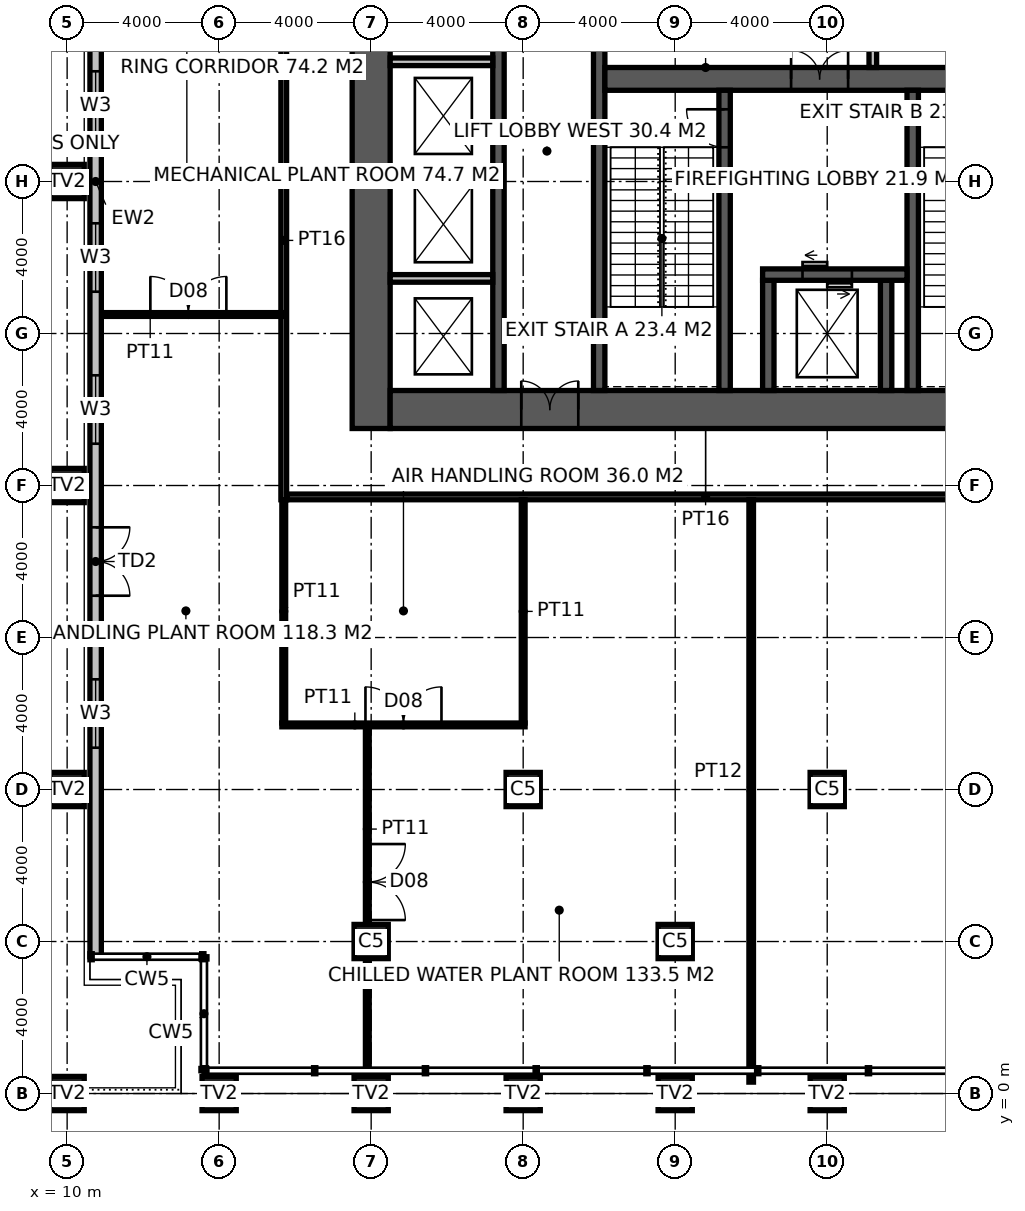
"""IFC4 building model, lengths in metres.
Left out: names, types, materials, properties, quantities, classifications, styles, units other than length and angle.
Written with IfcOpenShell. Run it as: python <this file> out.ifc"""

import sys

from ifc_helpers import new_model, si_unit, direction, frame, frame_2d, origin, origin_2d, place, context, subcontext, project, spatial, rectangle, hollow_rectangle, extrude, element, fill, save


model = new_model("IFC4")
c1 = context("Model", 3, precision=1e-05, world=origin(), true_north=direction((0.0, 1.0)))
c2 = subcontext(c1, "Body", "Model", "MODEL_VIEW")
j1 = project(units=[si_unit("LENGTHUNIT", "METRE"), si_unit("PLANEANGLEUNIT", "RADIAN")], contexts=[c1])
p1 = place(None, origin())
s1 = spatial("IfcSite", under=j1, at=p1, CompositionType="ELEMENT")
p2 = place(p1, origin())
s2 = spatial("IfcBuilding", under=s1, at=p2, CompositionType="ELEMENT")
p3 = place(p2, frame((0.0, 0.0, 71.0)))
s3 = spatial("IfcBuildingStorey", under=s2, at=p3, CompositionType="ELEMENT", Elevation=71.0)
for number, where, z_axis, x_axis in (
    (1, (10.0, 0.0, 0.0), (0.0, 0.0, 1.0), (1.0, 0.0, 0.0)),
    (2, (10.0, 8.0, 0.0), (0.0, 0.0, 1.0), (1.0, 0.0, 0.0)),
    (3, (10.0, 16.0, 0.0), (0.0, 0.0, 1.0), (1.0, 0.0, 0.0)),
    (4, (10.0, 24.0, 0.0), (0.0, 0.0, 1.0), (1.0, 0.0, 0.0)),
    (5, (14.0, 0.0, 0.0), (0.0, 0.0, 1.0), (1.0, 0.0, 0.0)),
    (6, (18.0, 0.0, 0.0), (0.0, 0.0, 1.0), (1.0, 0.0, 0.0)),
    (7, (22.0, 0.0, 0.0), (0.0, 0.0, 1.0), (1.0, 0.0, 0.0)),
    (8, (26.0, 0.0, 0.0), (0.0, 0.0, 1.0), (1.0, 0.0, 0.0)),
    (9, (30.0, 0.0, 0.0), (0.0, 0.0, 1.0), (1.0, 0.0, 0.0)),
):
    element("IfcColumn", number, at=place(p3, frame(where, z_axis=z_axis, x_axis=x_axis)), inside=s3, PredefinedType="USERDEFINED", context=c2, shape_type="SweptSolid", body=[
        extrude(hollow_rectangle(XDim=0.9, YDim=0.9, WallThickness=0.1, at=origin_2d()), origin(), (0.0, 0.0, 1.0), 5.4),
    ])
for number, where, z_axis, x_axis in (
    (10, (18.0, 4.0, 0.0), (0.0, 0.0, 1.0), (1.0, 0.0, 0.0)),
    (11, (22.0, 8.0, 0.0), (0.0, 0.0, 1.0), (1.0, 0.0, 0.0)),
    (12, (26.0, 4.0, 0.0), (0.0, 0.0, 1.0), (1.0, 0.0, 0.0)),
    (13, (30.0, 8.0, 0.0), (0.0, 0.0, 1.0), (1.0, 0.0, 0.0)),
):
    element("IfcColumn", number, at=place(p3, frame(where, z_axis=z_axis, x_axis=x_axis)), inside=s3, PredefinedType="COLUMN", context=c2, shape_type="SweptSolid", body=[
        extrude(hollow_rectangle(XDim=0.9, YDim=0.9, WallThickness=0.1, at=origin_2d()), origin(), (0.0, 0.0, 1.0), 5.4),
    ])
p4 = place(p3, frame((18.0, 17.5, -0.15), z_axis=(0.0, 0.0, 1.0), x_axis=(0.0, 1.0, 0.0)))
e14 = element("IfcWall", 14, at=p4, inside=s3, PredefinedType="SHEAR", context=c2, shape_type="SweptSolid", body=[
    extrude(rectangle(XDim=19.0, YDim=1.0, at=frame_2d((9.5, 0.0))), origin(), (0.0, 0.0, 1.0), 5.4),
])
p5 = place(p3, frame((18.5, 18.0, -0.15), z_axis=(0.0, 0.0, 1.0), x_axis=(1.0, 0.0, 0.0)))
e15 = element("IfcWall", 15, at=p5, inside=s3, PredefinedType="SHEAR", context=c2, shape_type="SweptSolid", body=[
    extrude(rectangle(XDim=17.6, YDim=1.0, at=frame_2d((8.8, 0.0))), origin(), (0.0, 0.0, 1.0), 5.4),
])
p6 = place(p5, frame((3.45, 0.0, 0.15)))
e16 = element("IfcOpeningElement", 16, at=p6, cuts=e15, PredefinedType="OPENING", context=c2, shape_type="SweptSolid", body=[
    extrude(rectangle(XDim=1.5, YDim=2.4, at=frame_2d((0.75, 1.2))), frame((0.0, 0.51, 0.0), z_axis=(0.0, -1.0, 0.0), x_axis=(1.0, 0.0, 0.0)), (0.0, 0.0, 1.0), 1.02),
])
p7 = place(p3, frame((24.0, 18.5, -0.15), z_axis=(0.0, 0.0, 1.0), x_axis=(0.0, 1.0, 0.0)))
e17 = element("IfcWall", 17, at=p7, inside=s3, PredefinedType="SHEAR", context=c2, shape_type="SweptSolid", body=[
    extrude(rectangle(XDim=17.0, YDim=0.3, at=frame_2d((8.5, 0.0))), origin(), (0.0, 0.0, 1.0), 5.4),
])
p8 = place(p7, frame((9.6, 0.0, 0.15)))
e18 = element("IfcOpeningElement", 18, at=p8, cuts=e17, PredefinedType="OPENING", context=c2, shape_type="SweptSolid", body=[
    extrude(rectangle(XDim=1.5, YDim=2.4, at=frame_2d((0.75, 1.2))), frame((0.0, 0.16, 0.0), z_axis=(0.0, -1.0, 0.0), x_axis=(1.0, 0.0, 0.0)), (0.0, 0.0, 1.0), 0.32),
])
p9 = place(p3, frame((24.15, 26.7, -0.15), z_axis=(0.0, 0.0, 1.0), x_axis=(1.0, 0.0, 0.0)))
e19 = element("IfcWall", 19, at=p9, inside=s3, PredefinedType="SHEAR", context=c2, shape_type="SweptSolid", body=[
    extrude(rectangle(XDim=11.25, YDim=0.6, at=frame_2d((5.625, 0.0))), origin(), (0.0, 0.0, 1.0), 5.4),
])
p10 = place(p9, frame((9.25, 0.0, 0.15)))
e20 = element("IfcOpeningElement", 20, at=p10, cuts=e19, PredefinedType="OPENING", context=c2, shape_type="SweptSolid", body=[
    extrude(rectangle(XDim=1.0, YDim=2.2, at=frame_2d((0.5, 1.1))), frame((0.0, 0.31, 0.0), z_axis=(0.0, -1.0, 0.0), x_axis=(1.0, 0.0, 0.0)), (0.0, 0.0, 1.0), 0.62),
])
p11 = place(p9, frame((4.9, 0.0, 0.15)))
e21 = element("IfcOpeningElement", 21, at=p11, cuts=e19, PredefinedType="OPENING", context=c2, shape_type="SweptSolid", body=[
    extrude(rectangle(XDim=1.5, YDim=2.4, at=frame_2d((0.75, 1.2))), frame((0.0, 0.31, 0.0), z_axis=(0.0, -1.0, 0.0), x_axis=(1.0, 0.0, 0.0)), (0.0, 0.0, 1.0), 0.62),
])
p12 = place(p3, frame((27.3, 18.5, -0.15), z_axis=(0.0, 0.0, 1.0), x_axis=(0.0, 1.0, 0.0)))
e22 = element("IfcWall", 22, at=p12, inside=s3, PredefinedType="SHEAR", context=c2, shape_type="SweptSolid", body=[
    extrude(rectangle(XDim=7.9, YDim=0.3, at=frame_2d((3.95, 0.0))), origin(), (0.0, 0.0, 1.0), 5.4),
])
p13 = place(p12, frame((6.4, 0.0, 0.15)))
e23 = element("IfcOpeningElement", 23, at=p13, cuts=e22, PredefinedType="OPENING", context=c2, shape_type="SweptSolid", body=[
    extrude(rectangle(XDim=1.0, YDim=2.2, at=frame_2d((0.5, 1.1))), frame((0.0, 0.16, 0.0), z_axis=(0.0, -1.0, 0.0), x_axis=(1.0, 0.0, 0.0)), (0.0, 0.0, 1.0), 0.32),
])
p14 = place(p3, frame((32.25, 18.5, -0.15), z_axis=(0.0, 0.0, 1.0), x_axis=(0.0, 1.0, 0.0)))
e24 = element("IfcWall", 24, at=p14, inside=s3, PredefinedType="SHEAR", context=c2, shape_type="SweptSolid", body=[
    extrude(rectangle(XDim=7.9, YDim=0.3, at=frame_2d((3.95, 0.0))), origin(), (0.0, 0.0, 1.0), 5.4),
])
for number, where, z_axis, x_axis in (
    (25, (28.45, 18.5, -0.15), (0.0, 0.0, 1.0), (0.0, 1.0, 0.0)),
    (26, (31.55, 18.5, -0.15), (0.0, 0.0, 1.0), (0.0, 1.0, 0.0)),
):
    element("IfcWall", number, at=place(p3, frame(where, z_axis=z_axis, x_axis=x_axis)), inside=s3, PredefinedType="SHEAR", context=c2, shape_type="SweptSolid", body=[
        extrude(rectangle(XDim=2.9, YDim=0.3, at=frame_2d((1.45, 0.0))), origin(), (0.0, 0.0, 1.0), 5.4),
    ])
p15 = place(p3, frame((28.3, 21.55, -0.15), z_axis=(0.0, 0.0, 1.0), x_axis=(1.0, 0.0, 0.0)))
e27 = element("IfcWall", 27, at=p15, inside=s3, PredefinedType="SHEAR", context=c2, shape_type="SweptSolid", body=[
    extrude(rectangle(XDim=3.8, YDim=0.3, at=frame_2d((1.9, 0.0))), origin(), (0.0, 0.0, 1.0), 5.4),
])
p16 = place(p15, frame((1.05, 0.0, 0.15)))
e28 = element("IfcOpeningElement", 28, at=p16, cuts=e27, PredefinedType="OPENING", context=c2, shape_type="SweptSolid", body=[
    extrude(rectangle(XDim=1.3, YDim=2.4, at=frame_2d((0.65, 1.2))), frame((0.0, 0.16, 0.0), z_axis=(0.0, -1.0, 0.0), x_axis=(1.0, 0.0, 0.0)), (0.0, 0.0, 1.0), 0.32),
])
p17 = place(p3, frame((21.35, 18.5, -0.15), z_axis=(0.0, 0.0, 1.0), x_axis=(0.0, 1.0, 0.0)))
e29 = element("IfcWall", 29, at=p17, inside=s3, PredefinedType="SHEAR", context=c2, shape_type="SweptSolid", body=[
    extrude(rectangle(XDim=12.5, YDim=0.3, at=frame_2d((6.25, 0.0))), origin(), (0.0, 0.0, 1.0), 5.4),
])
for number, where, z_axis, x_axis in (
    (30, (18.5, 21.45, 0.0), (0.0, 0.0, 1.0), (1.0, 0.0, 0.0)),
    (31, (18.5, 24.3, 0.0), (0.0, 0.0, 1.0), (1.0, 0.0, 0.0)),
    (32, (18.5, 27.15, 0.0), (0.0, 0.0, 1.0), (1.0, 0.0, 0.0)),
):
    element("IfcWall", number, at=place(p3, frame(where, z_axis=z_axis, x_axis=x_axis)), inside=s3, PredefinedType="SOLIDWALL", context=c2, shape_type="SweptSolid", body=[
        extrude(rectangle(XDim=2.7, YDim=0.2, at=frame_2d((1.35, 0.0))), origin(), (0.0, 0.0, 1.0), 5.25),
    ])
p18 = place(p3, frame((31.2, 27.0, 0.0), z_axis=(0.0, 0.0, 1.0), x_axis=(0.0, 1.0, 0.0)))
e33 = element("IfcWall", 33, at=p18, inside=s3, PredefinedType="SOLIDWALL", context=c2, shape_type="SweptSolid", body=[
    extrude(rectangle(XDim=3.7, YDim=0.2, at=frame_2d((1.85, 0.0))), origin(), (0.0, 0.0, 1.0), 5.25),
])
p19 = place(p3, frame((15.7, 15.625, 0.0), z_axis=(0.0, 0.0, 1.0), x_axis=(0.0, 1.0, 0.0)))
e34 = element("IfcWall", 34, at=p19, inside=s3, PredefinedType="PARTITIONING", context=c2, shape_type="SweptSolid", body=[
    extrude(rectangle(XDim=22.75, YDim=0.15, at=frame_2d((11.375, 0.0))), origin(), (0.0, 0.0, 1.0), 5.25),
])
p20 = place(p19, frame((12.925, 0.0, 0.0)))
e35 = element("IfcOpeningElement", 35, at=p20, cuts=e34, PredefinedType="OPENING", context=c2, shape_type="SweptSolid", body=[
    extrude(rectangle(XDim=3.0, YDim=3.3, at=frame_2d((1.5, 1.65))), frame((0.0, 0.085, 0.0), z_axis=(0.0, -1.0, 0.0), x_axis=(1.0, 0.0, 0.0)), (0.0, 0.0, 1.0), 0.17),
])
p21 = place(p3, frame((15.775, 15.7, 0.0), z_axis=(0.0, 0.0, 1.0), x_axis=(1.0, 0.0, 0.0)))
e36 = element("IfcWall", 36, at=p21, inside=s3, PredefinedType="PARTITIONING", context=c2, shape_type="SweptSolid", body=[
    extrude(rectangle(XDim=22.05, YDim=0.15, at=frame_2d((11.025, 0.0))), origin(), (0.0, 0.0, 1.0), 5.25),
])
p22 = place(p3, frame((28.0, 0.3, 0.0), z_axis=(0.0, 0.0, 1.0), x_axis=(0.0, 1.0, 0.0)))
e37 = element("IfcWall", 37, at=p22, inside=s3, PredefinedType="PARTITIONING", context=c2, shape_type="SweptSolid", body=[
    extrude(rectangle(XDim=15.325, YDim=0.12, at=frame_2d((7.663, 0.0))), origin(), (0.0, 0.0, 1.0), 5.25),
])
p23 = place(p3, frame((15.65, 9.7, 0.0), z_axis=(0.0, 0.0, 1.0), x_axis=(1.0, 0.0, 0.0)))
e38 = element("IfcWall", 38, at=p23, inside=s3, PredefinedType="PARTITIONING", context=c2, shape_type="SweptSolid", body=[
    extrude(rectangle(XDim=6.4, YDim=0.1, at=frame_2d((3.2, 0.0))), origin(), (0.0, 0.0, 1.0), 5.25),
])
p24 = place(p23, frame((2.2, 0.0, 0.0)))
e39 = element("IfcOpeningElement", 39, at=p24, cuts=e38, PredefinedType="OPENING", context=c2, shape_type="SweptSolid", body=[
    extrude(rectangle(XDim=2.0, YDim=2.4, at=frame_2d((1.0, 1.2))), frame((0.0, 0.06, 0.0), z_axis=(0.0, -1.0, 0.0), x_axis=(1.0, 0.0, 0.0)), (0.0, 0.0, 1.0), 0.12),
])
p25 = place(p3, frame((15.7, 9.75, 0.0), z_axis=(0.0, 0.0, 1.0), x_axis=(0.0, 1.0, 0.0)))
e40 = element("IfcWall", 40, at=p25, inside=s3, PredefinedType="PARTITIONING", context=c2, shape_type="SweptSolid", body=[
    extrude(rectangle(XDim=5.875, YDim=0.1, at=frame_2d((2.938, 0.0))), origin(), (0.0, 0.0, 1.0), 5.25),
])
p26 = place(p3, frame((22.0, 9.75, 0.0), z_axis=(0.0, 0.0, 1.0), x_axis=(0.0, 1.0, 0.0)))
e41 = element("IfcWall", 41, at=p26, inside=s3, PredefinedType="PARTITIONING", context=c2, shape_type="SweptSolid", body=[
    extrude(rectangle(XDim=5.875, YDim=0.1, at=frame_2d((2.938, 0.0))), origin(), (0.0, 0.0, 1.0), 4.35),
])
p27 = place(p3, frame((10.68, 20.5, 0.0), z_axis=(0.0, 0.0, 1.0), x_axis=(1.0, 0.0, 0.0)))
e42 = element("IfcWall", 42, at=p27, inside=s3, PredefinedType="PARTITIONING", context=c2, shape_type="SweptSolid", body=[
    extrude(rectangle(XDim=5.02, YDim=0.1, at=frame_2d((2.51, 0.0))), origin(), (0.0, 0.0, 1.0), 4.05),
])
p28 = place(p27, frame((1.51, 0.0, 0.0)))
e43 = element("IfcOpeningElement", 43, at=p28, cuts=e42, PredefinedType="OPENING", context=c2, shape_type="SweptSolid", body=[
    extrude(rectangle(XDim=2.0, YDim=2.4, at=frame_2d((1.0, 1.2))), frame((0.0, 0.06, 0.0), z_axis=(0.0, -1.0, 0.0), x_axis=(1.0, 0.0, 0.0)), (0.0, 0.0, 1.0), 0.12),
])
p29 = place(p3, frame((17.899, 9.65, 0.0), z_axis=(0.0, 0.0, 1.0), x_axis=(0.0, -1.0, 0.0)))
e44 = element("IfcWall", 44, at=p29, inside=s3, PredefinedType="PARTITIONING", context=c2, shape_type="SweptSolid", body=[
    extrude(rectangle(XDim=8.97, YDim=0.1, at=frame_2d((4.485, 0.0))), origin(), (0.0, 0.0, 1.0), 4.25),
])
p30 = place(p29, frame((3.085, 0.0, 0.0)))
e45 = element("IfcOpeningElement", 45, at=p30, cuts=e44, PredefinedType="OPENING", context=c2, shape_type="SweptSolid", body=[
    extrude(rectangle(XDim=2.0, YDim=2.4, at=frame_2d((1.0, 1.2))), frame((0.0, 0.06, 0.0), z_axis=(0.0, -1.0, 0.0), x_axis=(1.0, 0.0, 0.0)), (0.0, 0.0, 1.0), 0.12),
])
p31 = place(p3, frame((10.75, 44.4, 0.0), z_axis=(0.0, 0.0, 1.0), x_axis=(0.0, -1.0, 0.0)))
e46 = element("IfcWall", 46, at=p31, inside=s3, PredefinedType="ELEMENTEDWALL", context=c2, shape_type="SweptSolid", body=[
    extrude(rectangle(XDim=40.8, YDim=0.3, at=frame_2d((20.4, 0.0))), origin(), (0.0, 0.0, 1.0), 5.25),
])
p32 = place(p31, frame((33.5, 0.0, 0.8)))
e47 = element("IfcOpeningElement", 47, at=p32, cuts=e46, PredefinedType="OPENING", context=c2, shape_type="SweptSolid", body=[
    extrude(rectangle(XDim=1.8, YDim=2.4, at=frame_2d((0.9, 1.2))), frame((0.0, 0.16, 0.0), z_axis=(0.0, -1.0, 0.0), x_axis=(1.0, 0.0, 0.0)), (0.0, 0.0, 1.0), 0.32),
])
p33 = place(p31, frame((29.5, 0.0, 0.0)))
e48 = element("IfcOpeningElement", 48, at=p33, cuts=e46, PredefinedType="OPENING", context=c2, shape_type="SweptSolid", body=[
    extrude(rectangle(XDim=1.8, YDim=2.4, at=frame_2d((0.9, 1.2))), frame((0.0, 0.16, 0.0), z_axis=(0.0, -1.0, 0.0), x_axis=(1.0, 0.0, 0.0)), (0.0, 0.0, 1.0), 0.32),
])
p34 = place(p31, frame((25.5, 0.0, 0.8)))
e49 = element("IfcOpeningElement", 49, at=p34, cuts=e46, PredefinedType="OPENING", context=c2, shape_type="SweptSolid", body=[
    extrude(rectangle(XDim=1.8, YDim=2.4, at=frame_2d((0.9, 1.2))), frame((0.0, 0.16, 0.0), z_axis=(0.0, -1.0, 0.0), x_axis=(1.0, 0.0, 0.0)), (0.0, 0.0, 1.0), 0.32),
])
p35 = place(p31, frame((21.5, 0.0, 0.8)))
e50 = element("IfcOpeningElement", 50, at=p35, cuts=e46, PredefinedType="OPENING", context=c2, shape_type="SweptSolid", body=[
    extrude(rectangle(XDim=1.8, YDim=2.4, at=frame_2d((0.9, 1.2))), frame((0.0, 0.16, 0.0), z_axis=(0.0, -1.0, 0.0), x_axis=(1.0, 0.0, 0.0)), (0.0, 0.0, 1.0), 0.32),
])
p36 = place(p31, frame((17.5, 0.0, 0.8)))
e51 = element("IfcOpeningElement", 51, at=p36, cuts=e46, PredefinedType="OPENING", context=c2, shape_type="SweptSolid", body=[
    extrude(rectangle(XDim=1.8, YDim=2.4, at=frame_2d((0.9, 1.2))), frame((0.0, 0.16, 0.0), z_axis=(0.0, -1.0, 0.0), x_axis=(1.0, 0.0, 0.0)), (0.0, 0.0, 1.0), 0.32),
])
p37 = place(p31, frame((13.5, 0.0, 0.8)))
e52 = element("IfcOpeningElement", 52, at=p37, cuts=e46, PredefinedType="OPENING", context=c2, shape_type="SweptSolid", body=[
    extrude(rectangle(XDim=1.8, YDim=2.4, at=frame_2d((0.9, 1.2))), frame((0.0, 0.16, 0.0), z_axis=(0.0, -1.0, 0.0), x_axis=(1.0, 0.0, 0.0)), (0.0, 0.0, 1.0), 0.32),
])
p38 = place(p31, frame((9.5, 0.0, 0.0)))
e53 = element("IfcOpeningElement", 53, at=p38, cuts=e46, PredefinedType="OPENING", context=c2, shape_type="SweptSolid", body=[
    extrude(rectangle(XDim=1.8, YDim=2.4, at=frame_2d((0.9, 1.2))), frame((0.0, 0.16, 0.0), z_axis=(0.0, -1.0, 0.0), x_axis=(1.0, 0.0, 0.0)), (0.0, 0.0, 1.0), 0.32),
])
p39 = place(p31, frame((5.5, 0.0, 0.8)))
e54 = element("IfcOpeningElement", 54, at=p39, cuts=e46, PredefinedType="OPENING", context=c2, shape_type="SweptSolid", body=[
    extrude(rectangle(XDim=1.8, YDim=2.4, at=frame_2d((0.9, 1.2))), frame((0.0, 0.16, 0.0), z_axis=(0.0, -1.0, 0.0), x_axis=(1.0, 0.0, 0.0)), (0.0, 0.0, 1.0), 0.32),
])
p40 = place(p13, origin())
e55 = element("IfcDoor", 55, at=p40, inside=s3, OperationType="SINGLE_SWING_RIGHT", PredefinedType="DOOR", context=c2, shape_type="SweptSolid", body=[
    extrude(rectangle(XDim=1.0, YDim=2.2, at=frame_2d((0.5, 1.1))), frame((0.0, 0.025, 0.0), z_axis=(0.0, -1.0, 0.0), x_axis=(1.0, 0.0, 0.0)), (0.0, 0.0, 1.0), 0.05),
])
fill(e23, e55)
p41 = place(p11, origin())
e56 = element("IfcDoor", 56, at=p41, inside=s3, OperationType="DOUBLE_DOOR_DOUBLE_SWING", PredefinedType="DOOR", context=c2, shape_type="SweptSolid", body=[
    extrude(rectangle(XDim=1.5, YDim=2.4, at=frame_2d((0.75, 1.2))), frame((0.0, 0.025, 0.0), z_axis=(0.0, -1.0, 0.0), x_axis=(1.0, 0.0, 0.0)), (0.0, 0.0, 1.0), 0.05),
])
fill(e21, e56)
p42 = place(p6, origin())
e57 = element("IfcDoor", 57, at=p42, inside=s3, OperationType="DOUBLE_DOOR_DOUBLE_SWING", PredefinedType="DOOR", context=c2, shape_type="SweptSolid", body=[
    extrude(rectangle(XDim=1.5, YDim=2.4, at=frame_2d((0.75, 1.2))), frame((0.0, 0.025, 0.0), z_axis=(0.0, -1.0, 0.0), x_axis=(1.0, 0.0, 0.0)), (0.0, 0.0, 1.0), 0.05),
])
fill(e16, e57)
p43 = place(p24, origin())
e58 = element("IfcDoor", 58, at=p43, inside=s3, OperationType="DOUBLE_DOOR_DOUBLE_SWING", PredefinedType="DOOR", context=c2, shape_type="SweptSolid", body=[
    extrude(rectangle(XDim=2.0, YDim=2.4, at=frame_2d((1.0, 1.2))), frame((0.0, 0.025, 0.0), z_axis=(0.0, -1.0, 0.0), x_axis=(1.0, 0.0, 0.0)), (0.0, 0.0, 1.0), 0.05),
])
fill(e39, e58)
p44 = place(p28, origin())
e59 = element("IfcDoor", 59, at=p44, inside=s3, OperationType="DOUBLE_DOOR_DOUBLE_SWING", PredefinedType="DOOR", context=c2, shape_type="SweptSolid", body=[
    extrude(rectangle(XDim=2.0, YDim=2.4, at=frame_2d((1.0, 1.2))), frame((0.0, 0.025, 0.0), z_axis=(0.0, -1.0, 0.0), x_axis=(1.0, 0.0, 0.0)), (0.0, 0.0, 1.0), 0.05),
])
fill(e43, e59)
p45 = place(p30, origin())
e60 = element("IfcDoor", 60, at=p45, inside=s3, OperationType="DOUBLE_DOOR_DOUBLE_SWING", PredefinedType="DOOR", context=c2, shape_type="SweptSolid", body=[
    extrude(rectangle(XDim=2.0, YDim=2.4, at=frame_2d((1.0, 1.2))), frame((0.0, 0.025, 0.0), z_axis=(0.0, -1.0, 0.0), x_axis=(1.0, 0.0, 0.0)), (0.0, 0.0, 1.0), 0.05),
])
fill(e45, e60)
p46 = place(p16, origin())
e61 = element("IfcDoor", 61, at=p46, inside=s3, OperationType="DOUBLE_DOOR_SLIDING", PredefinedType="DOOR", context=c2, shape_type="SweptSolid", body=[
    extrude(rectangle(XDim=1.3, YDim=2.4, at=frame_2d((0.65, 1.2))), frame((0.0, 0.025, 0.0), z_axis=(0.0, -1.0, 0.0), x_axis=(1.0, 0.0, 0.0)), (0.0, 0.0, 1.0), 0.05),
])
fill(e28, e61)
p47 = place(p32, origin())
e62 = element("IfcWindow", 62, at=p47, inside=s3, PartitioningType="SINGLE_PANEL", PredefinedType="WINDOW", context=c2, shape_type="SweptSolid", body=[
    extrude(rectangle(XDim=1.8, YDim=2.4, at=frame_2d((0.9, 1.2))), frame((0.0, 0.03, 0.0), z_axis=(0.0, -1.0, 0.0), x_axis=(1.0, 0.0, 0.0)), (0.0, 0.0, 1.0), 0.06),
])
fill(e47, e62)
p48 = place(p33, origin())
e63 = element("IfcDoor", 63, at=p48, inside=s3, OperationType="DOUBLE_DOOR_SINGLE_SWING", PredefinedType="DOOR", context=c2, shape_type="SweptSolid", body=[
    extrude(rectangle(XDim=1.8, YDim=2.4, at=frame_2d((0.9, 1.2))), frame((0.0, 0.025, 0.0), z_axis=(0.0, -1.0, 0.0), x_axis=(1.0, 0.0, 0.0)), (0.0, 0.0, 1.0), 0.05),
])
fill(e48, e63)
p49 = place(p34, origin())
e64 = element("IfcWindow", 64, at=p49, inside=s3, PartitioningType="SINGLE_PANEL", PredefinedType="WINDOW", context=c2, shape_type="SweptSolid", body=[
    extrude(rectangle(XDim=1.8, YDim=2.4, at=frame_2d((0.9, 1.2))), frame((0.0, 0.03, 0.0), z_axis=(0.0, -1.0, 0.0), x_axis=(1.0, 0.0, 0.0)), (0.0, 0.0, 1.0), 0.06),
])
fill(e49, e64)
p50 = place(p35, origin())
e65 = element("IfcWindow", 65, at=p50, inside=s3, PartitioningType="SINGLE_PANEL", PredefinedType="WINDOW", context=c2, shape_type="SweptSolid", body=[
    extrude(rectangle(XDim=1.8, YDim=2.4, at=frame_2d((0.9, 1.2))), frame((0.0, 0.03, 0.0), z_axis=(0.0, -1.0, 0.0), x_axis=(1.0, 0.0, 0.0)), (0.0, 0.0, 1.0), 0.06),
])
fill(e50, e65)
p51 = place(p36, origin())
e66 = element("IfcWindow", 66, at=p51, inside=s3, PartitioningType="SINGLE_PANEL", PredefinedType="WINDOW", context=c2, shape_type="SweptSolid", body=[
    extrude(rectangle(XDim=1.8, YDim=2.4, at=frame_2d((0.9, 1.2))), frame((0.0, 0.03, 0.0), z_axis=(0.0, -1.0, 0.0), x_axis=(1.0, 0.0, 0.0)), (0.0, 0.0, 1.0), 0.06),
])
fill(e51, e66)
save(model, sys.argv[1])
